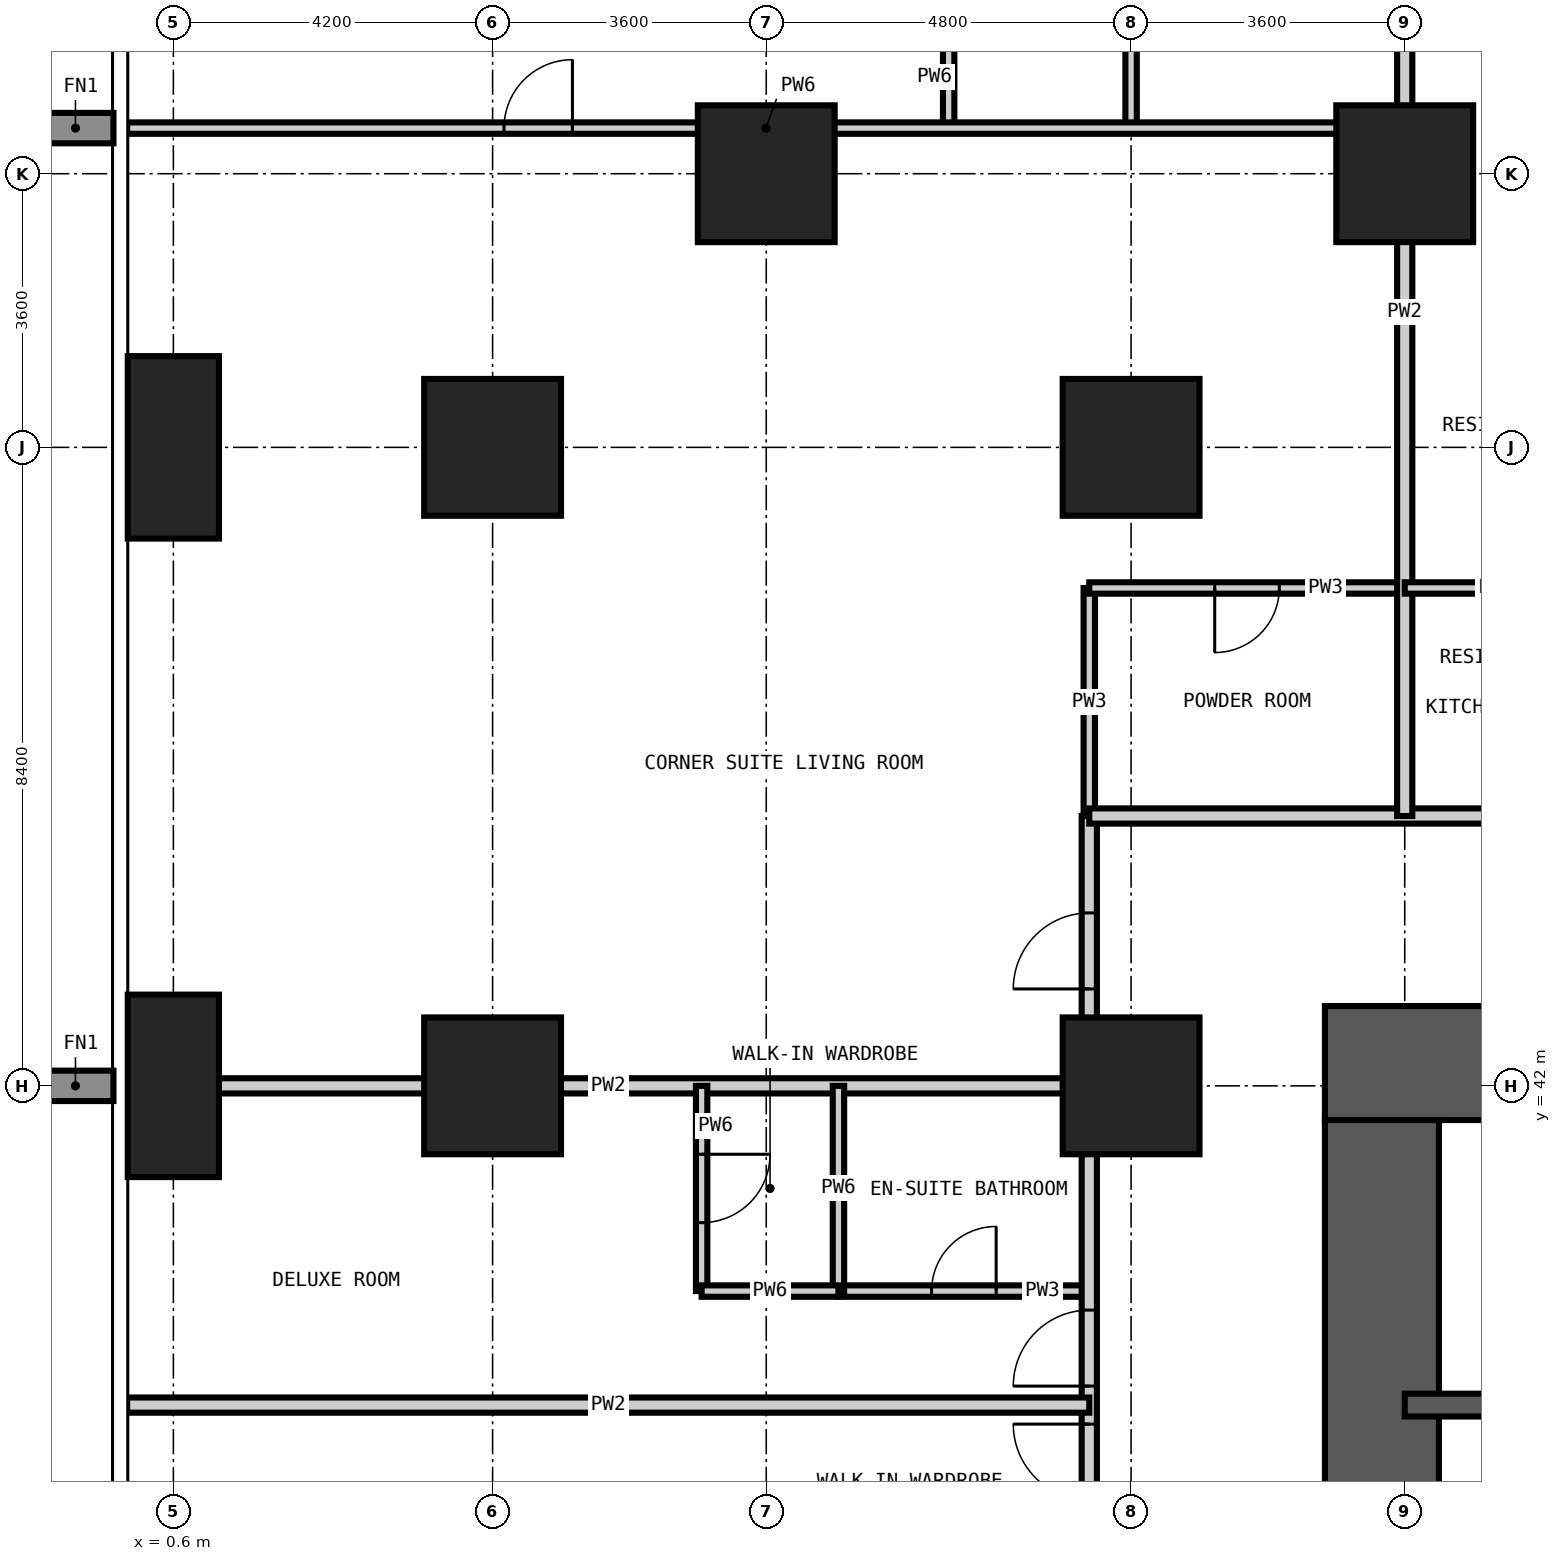
"""IFC4 building model, lengths in metres.
Left out: names, types, materials, properties, quantities, classifications, styles, units other than length and angle.
Written with IfcOpenShell. Run it as: python <this file> out.ifc"""

import sys

from ifc_helpers import new_model, si_unit, direction, frame, frame_2d, origin, origin_2d, place, context, subcontext, project, spatial, rectangle, extrude, element, fill, save


model = new_model("IFC4")
c1 = context("Model", 3, precision=1e-05, world=origin(), true_north=direction((0.0, 1.0)))
c2 = subcontext(c1, "Body", "Model", "MODEL_VIEW")
j1 = project(units=[si_unit("LENGTHUNIT", "METRE"), si_unit("PLANEANGLEUNIT", "RADIAN")], contexts=[c1])
p1 = place(None, origin())
s1 = spatial("IfcSite", under=j1, at=p1, CompositionType="ELEMENT")
p2 = place(p1, origin())
s2 = spatial("IfcBuilding", under=s1, at=p2, CompositionType="ELEMENT")
p3 = place(p2, frame((0.0, 0.0, 52.2)))
s3 = spatial("IfcBuildingStorey", under=s2, at=p3, CompositionType="ELEMENT", Elevation=52.2)
for number, where, z_axis, x_axis in (
    (1, (0.6, 42.0, -0.35), (0.0, 0.0, 1.0), (1.0, 0.0, 0.0)),
    (2, (0.6, 50.4, -0.35), (0.0, 0.0, 1.0), (1.0, 0.0, 0.0)),
):
    element("IfcColumn", number, at=place(p3, frame(where, z_axis=z_axis, x_axis=x_axis)), inside=s3, PredefinedType="COLUMN", context=c2, shape_type="SweptSolid", body=[
        extrude(rectangle(XDim=1.2, YDim=2.4, at=origin_2d()), origin(), (0.0, 0.0, 1.0), 3.6),
    ])
for number, where, z_axis, x_axis in (
    (3, (4.8, 42.0, -0.35), (0.0, 0.0, 1.0), (1.0, 0.0, 0.0)),
    (4, (4.8, 50.4, -0.35), (0.0, 0.0, 1.0), (1.0, 0.0, 0.0)),
    (5, (8.4, 54.0, -0.35), (0.0, 0.0, 1.0), (1.0, 0.0, 0.0)),
    (6, (13.2, 42.0, -0.35), (0.0, 0.0, 1.0), (1.0, 0.0, 0.0)),
    (7, (13.2, 50.4, -0.35), (0.0, 0.0, 1.0), (1.0, 0.0, 0.0)),
    (8, (16.8, 54.0, -0.35), (0.0, 0.0, 1.0), (1.0, 0.0, 0.0)),
):
    element("IfcColumn", number, at=place(p3, frame(where, z_axis=z_axis, x_axis=x_axis)), inside=s3, PredefinedType="COLUMN", context=c2, shape_type="SweptSolid", body=[
        extrude(rectangle(XDim=1.8, YDim=1.8, at=origin_2d()), origin(), (0.0, 0.0, 1.0), 3.6),
    ])
p4 = place(p3, frame((43.05, 42.3, -0.35), z_axis=(0.0, 0.0, 1.0), x_axis=(-1.0, 0.0, 0.0)))
e9 = element("IfcWall", 9, at=p4, inside=s3, PredefinedType="SHEAR", context=c2, shape_type="SweptSolid", body=[
    extrude(rectangle(XDim=27.3, YDim=1.5, at=frame_2d((13.65, 0.0))), origin(), (0.0, 0.0, 1.0), 3.6),
])
p5 = place(p4, frame((21.55, 0.0, 0.35)))
e10 = element("IfcOpeningElement", 10, at=p5, cuts=e9, PredefinedType="OPENING", context=c2, shape_type="SweptSolid", body=[
    extrude(rectangle(XDim=1.0, YDim=2.1, at=frame_2d((0.5, 1.05))), frame((0.0, 0.76, 0.0), z_axis=(0.0, -1.0, 0.0), x_axis=(1.0, 0.0, 0.0)), (0.0, 0.0, 1.0), 1.52),
])
p6 = place(p4, frame((10.95, 0.0, 0.35)))
e11 = element("IfcOpeningElement", 11, at=p6, cuts=e9, PredefinedType="OPENING", context=c2, shape_type="SweptSolid", body=[
    extrude(rectangle(XDim=1.2, YDim=2.2, at=frame_2d((0.6, 1.1))), frame((0.0, 0.76, 0.0), z_axis=(0.0, -1.0, 0.0), x_axis=(1.0, 0.0, 0.0)), (0.0, 0.0, 1.0), 1.52),
])
p7 = place(p3, frame((16.5, 41.55, -0.35), z_axis=(0.0, 0.0, 1.0), x_axis=(0.0, -1.0, 0.0)))
e12 = element("IfcWall", 12, at=p7, inside=s3, PredefinedType="SHEAR", context=c2, shape_type="SweptSolid", body=[
    extrude(rectangle(XDim=24.3, YDim=1.5, at=frame_2d((12.15, 0.0))), origin(), (0.0, 0.0, 1.0), 3.6),
])
p8 = place(p7, frame((11.25, 0.0, 0.35)))
e13 = element("IfcOpeningElement", 13, at=p8, cuts=e12, PredefinedType="OPENING", context=c2, shape_type="SweptSolid", body=[
    extrude(rectangle(XDim=1.8, YDim=2.2, at=frame_2d((0.9, 1.1))), frame((0.0, 0.76, 0.0), z_axis=(0.0, -1.0, 0.0), x_axis=(1.0, 0.0, 0.0)), (0.0, 0.0, 1.0), 1.52),
])
p9 = place(p7, frame((20.05, 0.0, 0.35)))
e14 = element("IfcOpeningElement", 14, at=p9, cuts=e12, PredefinedType="OPENING", context=c2, shape_type="SweptSolid", body=[
    extrude(rectangle(XDim=1.0, YDim=2.1, at=frame_2d((0.5, 1.05))), frame((0.0, 0.76, 0.0), z_axis=(0.0, -1.0, 0.0), x_axis=(1.0, 0.0, 0.0)), (0.0, 0.0, 1.0), 1.52),
])
p10 = place(p7, frame((5.35, 0.0, 0.35)))
e15 = element("IfcOpeningElement", 15, at=p10, cuts=e12, PredefinedType="OPENING", context=c2, shape_type="SweptSolid", body=[
    extrude(rectangle(XDim=1.0, YDim=2.1, at=frame_2d((0.5, 1.05))), frame((0.0, 0.76, 0.0), z_axis=(0.0, -1.0, 0.0), x_axis=(1.0, 0.0, 0.0)), (0.0, 0.0, 1.0), 1.52),
])
p11 = place(p3, frame((16.8, 37.8, -0.35), z_axis=(0.0, 0.0, 1.0), x_axis=(1.0, 0.0, 0.0)))
e16 = element("IfcWall", 16, at=p11, inside=s3, PredefinedType="SHEAR", context=c2, shape_type="SweptSolid", body=[
    extrude(rectangle(XDim=8.4, YDim=0.3, at=frame_2d((4.2, 0.0))), origin(), (0.0, 0.0, 1.0), 3.6),
])
p12 = place(p3, frame((12.65, 45.55, 0.0), z_axis=(0.0, 0.0, 1.0), x_axis=(0.0, 1.0, 0.0)))
e17 = element("IfcWall", 17, at=p12, inside=s3, PredefinedType="PARTITIONING", context=c2, shape_type="SweptSolid", body=[
    extrude(rectangle(XDim=3.0, YDim=0.15, at=frame_2d((1.5, 0.0))), origin(), (0.0, 0.0, 1.0), 3.25),
])
p13 = place(p3, frame((9.35, 39.3, 0.0), z_axis=(0.0, 0.0, 1.0), x_axis=(1.0, 0.0, 0.0)))
e18 = element("IfcWall", 18, at=p13, inside=s3, PredefinedType="PARTITIONING", context=c2, shape_type="SweptSolid", body=[
    extrude(rectangle(XDim=3.3, YDim=0.15, at=frame_2d((1.65, 0.0))), origin(), (0.0, 0.0, 1.0), 3.25),
])
p14 = place(p13, frame((1.225, 0.0, 0.0)))
e19 = element("IfcOpeningElement", 19, at=p14, cuts=e18, PredefinedType="OPENING", context=c2, shape_type="SweptSolid", body=[
    extrude(rectangle(XDim=0.85, YDim=2.1, at=frame_2d((0.425, 1.05))), frame((0.0, 0.085, 0.0), z_axis=(0.0, -1.0, 0.0), x_axis=(1.0, 0.0, 0.0)), (0.0, 0.0, 1.0), 0.17),
])
p15 = place(p3, frame((12.65, 48.55, 0.0), z_axis=(0.0, 0.0, 1.0), x_axis=(1.0, 0.0, 0.0)))
e20 = element("IfcWall", 20, at=p15, inside=s3, PredefinedType="PARTITIONING", context=c2, shape_type="SweptSolid", body=[
    extrude(rectangle(XDim=4.15, YDim=0.15, at=frame_2d((2.075, 0.0))), origin(), (0.0, 0.0, 1.0), 3.25),
])
p16 = place(p15, frame((1.65, 0.0, 0.0)))
e21 = element("IfcOpeningElement", 21, at=p16, cuts=e20, PredefinedType="OPENING", context=c2, shape_type="SweptSolid", body=[
    extrude(rectangle(XDim=0.85, YDim=2.1, at=frame_2d((0.425, 1.05))), frame((0.0, 0.085, 0.0), z_axis=(0.0, -1.0, 0.0), x_axis=(1.0, 0.0, 0.0)), (0.0, 0.0, 1.0), 0.17),
])
p17 = place(p3, frame((12.65, 12.65, 0.0), z_axis=(0.0, 0.0, 1.0), x_axis=(0.0, 1.0, 0.0)))
e22 = element("IfcWall", 22, at=p17, inside=s3, PredefinedType="PARTITIONING", context=c2, shape_type="SweptSolid", body=[
    extrude(rectangle(XDim=32.9, YDim=0.2, at=frame_2d((16.45, 0.0))), origin(), (0.0, 0.0, 1.0), 3.25),
])
p18 = place(p17, frame((8.75, 0.0, 0.0)))
e23 = element("IfcOpeningElement", 23, at=p18, cuts=e22, PredefinedType="OPENING", context=c2, shape_type="SweptSolid", body=[
    extrude(rectangle(XDim=1.0, YDim=2.2, at=frame_2d((0.5, 1.1))), frame((0.0, 0.11, 0.0), z_axis=(0.0, -1.0, 0.0), x_axis=(1.0, 0.0, 0.0)), (0.0, 0.0, 1.0), 0.22),
])
p19 = place(p17, frame((17.0, 0.0, 0.0)))
e24 = element("IfcOpeningElement", 24, at=p19, cuts=e22, PredefinedType="OPENING", context=c2, shape_type="SweptSolid", body=[
    extrude(rectangle(XDim=1.0, YDim=2.2, at=frame_2d((0.5, 1.1))), frame((0.0, 0.11, 0.0), z_axis=(0.0, -1.0, 0.0), x_axis=(1.0, 0.0, 0.0)), (0.0, 0.0, 1.0), 0.22),
])
p20 = place(p17, frame((23.9, 0.0, 0.0)))
e25 = element("IfcOpeningElement", 25, at=p20, cuts=e22, PredefinedType="OPENING", context=c2, shape_type="SweptSolid", body=[
    extrude(rectangle(XDim=1.0, YDim=2.2, at=frame_2d((0.5, 1.1))), frame((0.0, 0.11, 0.0), z_axis=(0.0, -1.0, 0.0), x_axis=(1.0, 0.0, 0.0)), (0.0, 0.0, 1.0), 0.22),
])
p21 = place(p17, frame((25.4, 0.0, 0.0)))
e26 = element("IfcOpeningElement", 26, at=p21, cuts=e22, PredefinedType="OPENING", context=c2, shape_type="SweptSolid", body=[
    extrude(rectangle(XDim=1.0, YDim=2.2, at=frame_2d((0.5, 1.1))), frame((0.0, 0.11, 0.0), z_axis=(0.0, -1.0, 0.0), x_axis=(1.0, 0.0, 0.0)), (0.0, 0.0, 1.0), 0.22),
])
p22 = place(p17, frame((1.575, 0.0, 0.0)))
e27 = element("IfcOpeningElement", 27, at=p22, cuts=e22, PredefinedType="OPENING", context=c2, shape_type="SweptSolid", body=[
    extrude(rectangle(XDim=1.0, YDim=2.2, at=frame_2d((0.5, 1.1))), frame((0.0, 0.11, 0.0), z_axis=(0.0, -1.0, 0.0), x_axis=(1.0, 0.0, 0.0)), (0.0, 0.0, 1.0), 0.22),
])
p23 = place(p17, frame((30.625, 0.0, 0.0)))
e28 = element("IfcOpeningElement", 28, at=p23, cuts=e22, PredefinedType="OPENING", context=c2, shape_type="SweptSolid", body=[
    extrude(rectangle(XDim=1.0, YDim=2.2, at=frame_2d((0.5, 1.1))), frame((0.0, 0.11, 0.0), z_axis=(0.0, -1.0, 0.0), x_axis=(1.0, 0.0, 0.0)), (0.0, 0.0, 1.0), 0.22),
])
p24 = place(p3, frame((12.65, 45.55, 0.0), z_axis=(0.0, 0.0, 1.0), x_axis=(1.0, 0.0, 0.0)))
e29 = element("IfcWall", 29, at=p24, inside=s3, PredefinedType="PARTITIONING", context=c2, shape_type="SweptSolid", body=[
    extrude(rectangle(XDim=32.3, YDim=0.2, at=frame_2d((16.15, 0.0))), origin(), (0.0, 0.0, 1.0), 3.25),
])
p25 = place(p24, frame((6.95, 0.0, 0.0)))
e30 = element("IfcOpeningElement", 30, at=p25, cuts=e29, PredefinedType="OPENING", context=c2, shape_type="SweptSolid", body=[
    extrude(rectangle(XDim=1.0, YDim=2.2, at=frame_2d((0.5, 1.1))), frame((0.0, 0.11, 0.0), z_axis=(0.0, -1.0, 0.0), x_axis=(1.0, 0.0, 0.0)), (0.0, 0.0, 1.0), 0.22),
])
p26 = place(p24, frame((15.35, 0.0, 0.0)))
e31 = element("IfcOpeningElement", 31, at=p26, cuts=e29, PredefinedType="OPENING", context=c2, shape_type="SweptSolid", body=[
    extrude(rectangle(XDim=1.0, YDim=2.2, at=frame_2d((0.5, 1.1))), frame((0.0, 0.11, 0.0), z_axis=(0.0, -1.0, 0.0), x_axis=(1.0, 0.0, 0.0)), (0.0, 0.0, 1.0), 0.22),
])
p27 = place(p24, frame((23.75, 0.0, 0.0)))
e32 = element("IfcOpeningElement", 32, at=p27, cuts=e29, PredefinedType="OPENING", context=c2, shape_type="SweptSolid", body=[
    extrude(rectangle(XDim=1.0, YDim=2.2, at=frame_2d((0.5, 1.1))), frame((0.0, 0.11, 0.0), z_axis=(0.0, -1.0, 0.0), x_axis=(1.0, 0.0, 0.0)), (0.0, 0.0, 1.0), 0.22),
])
p28 = place(p3, frame((16.8, 45.55, 0.0), z_axis=(0.0, 0.0, 1.0), x_axis=(0.0, 1.0, 0.0)))
e33 = element("IfcWall", 33, at=p28, inside=s3, PredefinedType="PARTITIONING", context=c2, shape_type="SweptSolid", body=[
    extrude(rectangle(XDim=13.258, YDim=0.2, at=frame_2d((6.629, 0.0))), origin(), (0.0, 0.0, 1.0), 3.25),
])
for number, where, z_axis, x_axis in (
    (34, (-0.008, 37.8, 0.0), (0.0, 0.0, 1.0), (1.0, 0.0, 0.0)),
    (35, (-0.008, 42.0, 0.0), (0.0, 0.0, 1.0), (1.0, 0.0, 0.0)),
):
    element("IfcWall", number, at=place(p3, frame(where, z_axis=z_axis, x_axis=x_axis)), inside=s3, PredefinedType="PARTITIONING", context=c2, shape_type="SweptSolid", body=[
        extrude(rectangle(XDim=12.658, YDim=0.2, at=frame_2d((6.329, 0.0))), origin(), (0.0, 0.0, 1.0), 3.25),
    ])
p29 = place(p3, frame((7.55, 39.3, 0.0), z_axis=(0.0, 0.0, 1.0), x_axis=(0.0, 1.0, 0.0)))
e36 = element("IfcWall", 36, at=p29, inside=s3, PredefinedType="PARTITIONING", context=c2, shape_type="SweptSolid", body=[
    extrude(rectangle(XDim=2.7, YDim=0.15, at=frame_2d((1.35, 0.0))), origin(), (0.0, 0.0, 1.0), 3.25),
])
p30 = place(p29, frame((0.9, 0.0, 0.0)))
e37 = element("IfcOpeningElement", 37, at=p30, cuts=e36, PredefinedType="OPENING", context=c2, shape_type="SweptSolid", body=[
    extrude(rectangle(XDim=0.9, YDim=2.1, at=frame_2d((0.45, 1.05))), frame((0.0, 0.085, 0.0), z_axis=(0.0, -1.0, 0.0), x_axis=(1.0, 0.0, 0.0)), (0.0, 0.0, 1.0), 0.17),
])
p31 = place(p3, frame((9.35, 39.3, 0.0), z_axis=(0.0, 0.0, 1.0), x_axis=(0.0, 1.0, 0.0)))
e38 = element("IfcWall", 38, at=p31, inside=s3, PredefinedType="PARTITIONING", context=c2, shape_type="SweptSolid", body=[
    extrude(rectangle(XDim=2.7, YDim=0.15, at=frame_2d((1.35, 0.0))), origin(), (0.0, 0.0, 1.0), 3.25),
])
p32 = place(p3, frame((10.8, 54.6, 0.0), z_axis=(0.0, 0.0, 1.0), x_axis=(0.0, 1.0, 0.0)))
e39 = element("IfcWall", 39, at=p32, inside=s3, PredefinedType="PARTITIONING", context=c2, shape_type="SweptSolid", body=[
    extrude(rectangle(XDim=3.0, YDim=0.15, at=frame_2d((1.5, 0.0))), origin(), (0.0, 0.0, 1.0), 3.25),
])
p33 = place(p32, frame((1.05, 0.0, 0.0)))
e40 = element("IfcOpeningElement", 40, at=p33, cuts=e39, PredefinedType="OPENING", context=c2, shape_type="SweptSolid", body=[
    extrude(rectangle(XDim=0.9, YDim=2.1, at=frame_2d((0.45, 1.05))), frame((0.0, 0.085, 0.0), z_axis=(0.0, -1.0, 0.0), x_axis=(1.0, 0.0, 0.0)), (0.0, 0.0, 1.0), 0.17),
])
p34 = place(p3, frame((13.2, 54.6, 0.0), z_axis=(0.0, 0.0, 1.0), x_axis=(0.0, 1.0, 0.0)))
e41 = element("IfcWall", 41, at=p34, inside=s3, PredefinedType="PARTITIONING", context=c2, shape_type="SweptSolid", body=[
    extrude(rectangle(XDim=3.0, YDim=0.15, at=frame_2d((1.5, 0.0))), origin(), (0.0, 0.0, 1.0), 3.25),
])
p35 = place(p3, frame((7.55, 39.3, 0.0), z_axis=(0.0, 0.0, 1.0), x_axis=(1.0, 0.0, 0.0)))
e42 = element("IfcWall", 42, at=p35, inside=s3, PredefinedType="PARTITIONING", context=c2, shape_type="SweptSolid", body=[
    extrude(rectangle(XDim=1.8, YDim=0.15, at=frame_2d((0.9, 0.0))), origin(), (0.0, 0.0, 1.0), 3.25),
])
p36 = place(p3, frame((16.8, 48.55, 0.0), z_axis=(0.0, 0.0, 1.0), x_axis=(1.0, 0.0, 0.0)))
e43 = element("IfcWall", 43, at=p36, inside=s3, PredefinedType="PARTITIONING", context=c2, shape_type="SweptSolid", body=[
    extrude(rectangle(XDim=2.4, YDim=0.15, at=frame_2d((1.2, 0.0))), origin(), (0.0, 0.0, 1.0), 3.25),
])
p37 = place(p3, frame((-0.008, 54.6, 0.0), z_axis=(0.0, 0.0, 1.0), x_axis=(1.0, 0.0, 0.0)))
e44 = element("IfcWall", 44, at=p37, inside=s3, PredefinedType="PARTITIONING", context=c2, shape_type="SweptSolid", body=[
    extrude(rectangle(XDim=16.808, YDim=0.15, at=frame_2d((8.404, 0.0))), origin(), (0.0, 0.0, 1.0), 3.25),
])
p38 = place(p37, frame((4.958, 0.0, 0.0)))
e45 = element("IfcOpeningElement", 45, at=p38, cuts=e44, PredefinedType="OPENING", context=c2, shape_type="SweptSolid", body=[
    extrude(rectangle(XDim=0.9, YDim=2.1, at=frame_2d((0.45, 1.05))), frame((0.0, 0.085, 0.0), z_axis=(0.0, -1.0, 0.0), x_axis=(1.0, 0.0, 0.0)), (0.0, 0.0, 1.0), 0.17),
])
p39 = place(p20, origin())
e46 = element("IfcDoor", 46, at=p39, inside=s3, OperationType="SINGLE_SWING_RIGHT", PredefinedType="DOOR", context=c2, shape_type="SweptSolid", body=[
    extrude(rectangle(XDim=1.0, YDim=2.2, at=frame_2d((0.5, 1.1))), frame((0.0, 0.025, 0.0), z_axis=(0.0, -1.0, 0.0), x_axis=(1.0, 0.0, 0.0)), (0.0, 0.0, 1.0), 0.05),
])
fill(e25, e46)
p40 = place(p21, origin())
e47 = element("IfcDoor", 47, at=p40, inside=s3, OperationType="SINGLE_SWING_LEFT", PredefinedType="DOOR", context=c2, shape_type="SweptSolid", body=[
    extrude(rectangle(XDim=1.0, YDim=2.2, at=frame_2d((0.5, 1.1))), frame((0.0, 0.025, 0.0), z_axis=(0.0, -1.0, 0.0), x_axis=(1.0, 0.0, 0.0)), (0.0, 0.0, 1.0), 0.05),
])
fill(e26, e47)
p41 = place(p14, origin())
e48 = element("IfcDoor", 48, at=p41, inside=s3, OperationType="SINGLE_SWING_RIGHT", PredefinedType="DOOR", context=c2, shape_type="SweptSolid", body=[
    extrude(rectangle(XDim=0.85, YDim=2.1, at=frame_2d((0.425, 1.05))), frame((0.0, 0.025, 0.0), z_axis=(0.0, -1.0, 0.0), x_axis=(1.0, 0.0, 0.0)), (0.0, 0.0, 1.0), 0.05),
])
fill(e19, e48)
p42 = place(p30, frame((0.9, 0.0, 0.0), z_axis=(0.0, 0.0, 1.0), x_axis=(-1.0, 0.0, 0.0)))
e49 = element("IfcDoor", 49, at=p42, inside=s3, OperationType="SINGLE_SWING_LEFT", PredefinedType="DOOR", context=c2, shape_type="SweptSolid", body=[
    extrude(rectangle(XDim=0.9, YDim=2.1, at=frame_2d((0.45, 1.05))), frame((0.0, 0.025, 0.0), z_axis=(0.0, -1.0, 0.0), x_axis=(1.0, 0.0, 0.0)), (0.0, 0.0, 1.0), 0.05),
])
fill(e37, e49)
p43 = place(p23, origin())
e50 = element("IfcDoor", 50, at=p43, inside=s3, OperationType="SINGLE_SWING_LEFT", PredefinedType="DOOR", context=c2, shape_type="SweptSolid", body=[
    extrude(rectangle(XDim=1.0, YDim=2.2, at=frame_2d((0.5, 1.1))), frame((0.0, 0.025, 0.0), z_axis=(0.0, -1.0, 0.0), x_axis=(1.0, 0.0, 0.0)), (0.0, 0.0, 1.0), 0.05),
])
fill(e28, e50)
p44 = place(p16, frame((0.85, 0.0, 0.0), z_axis=(0.0, 0.0, 1.0), x_axis=(-1.0, 0.0, 0.0)))
e51 = element("IfcDoor", 51, at=p44, inside=s3, OperationType="SINGLE_SWING_RIGHT", PredefinedType="DOOR", context=c2, shape_type="SweptSolid", body=[
    extrude(rectangle(XDim=0.85, YDim=2.1, at=frame_2d((0.425, 1.05))), frame((0.0, 0.025, 0.0), z_axis=(0.0, -1.0, 0.0), x_axis=(1.0, 0.0, 0.0)), (0.0, 0.0, 1.0), 0.05),
])
fill(e21, e51)
p45 = place(p38, origin())
e52 = element("IfcDoor", 52, at=p45, inside=s3, OperationType="SINGLE_SWING_RIGHT", PredefinedType="DOOR", context=c2, shape_type="SweptSolid", body=[
    extrude(rectangle(XDim=0.9, YDim=2.1, at=frame_2d((0.45, 1.05))), frame((0.0, 0.025, 0.0), z_axis=(0.0, -1.0, 0.0), x_axis=(1.0, 0.0, 0.0)), (0.0, 0.0, 1.0), 0.05),
])
fill(e45, e52)
save(model, sys.argv[1])
